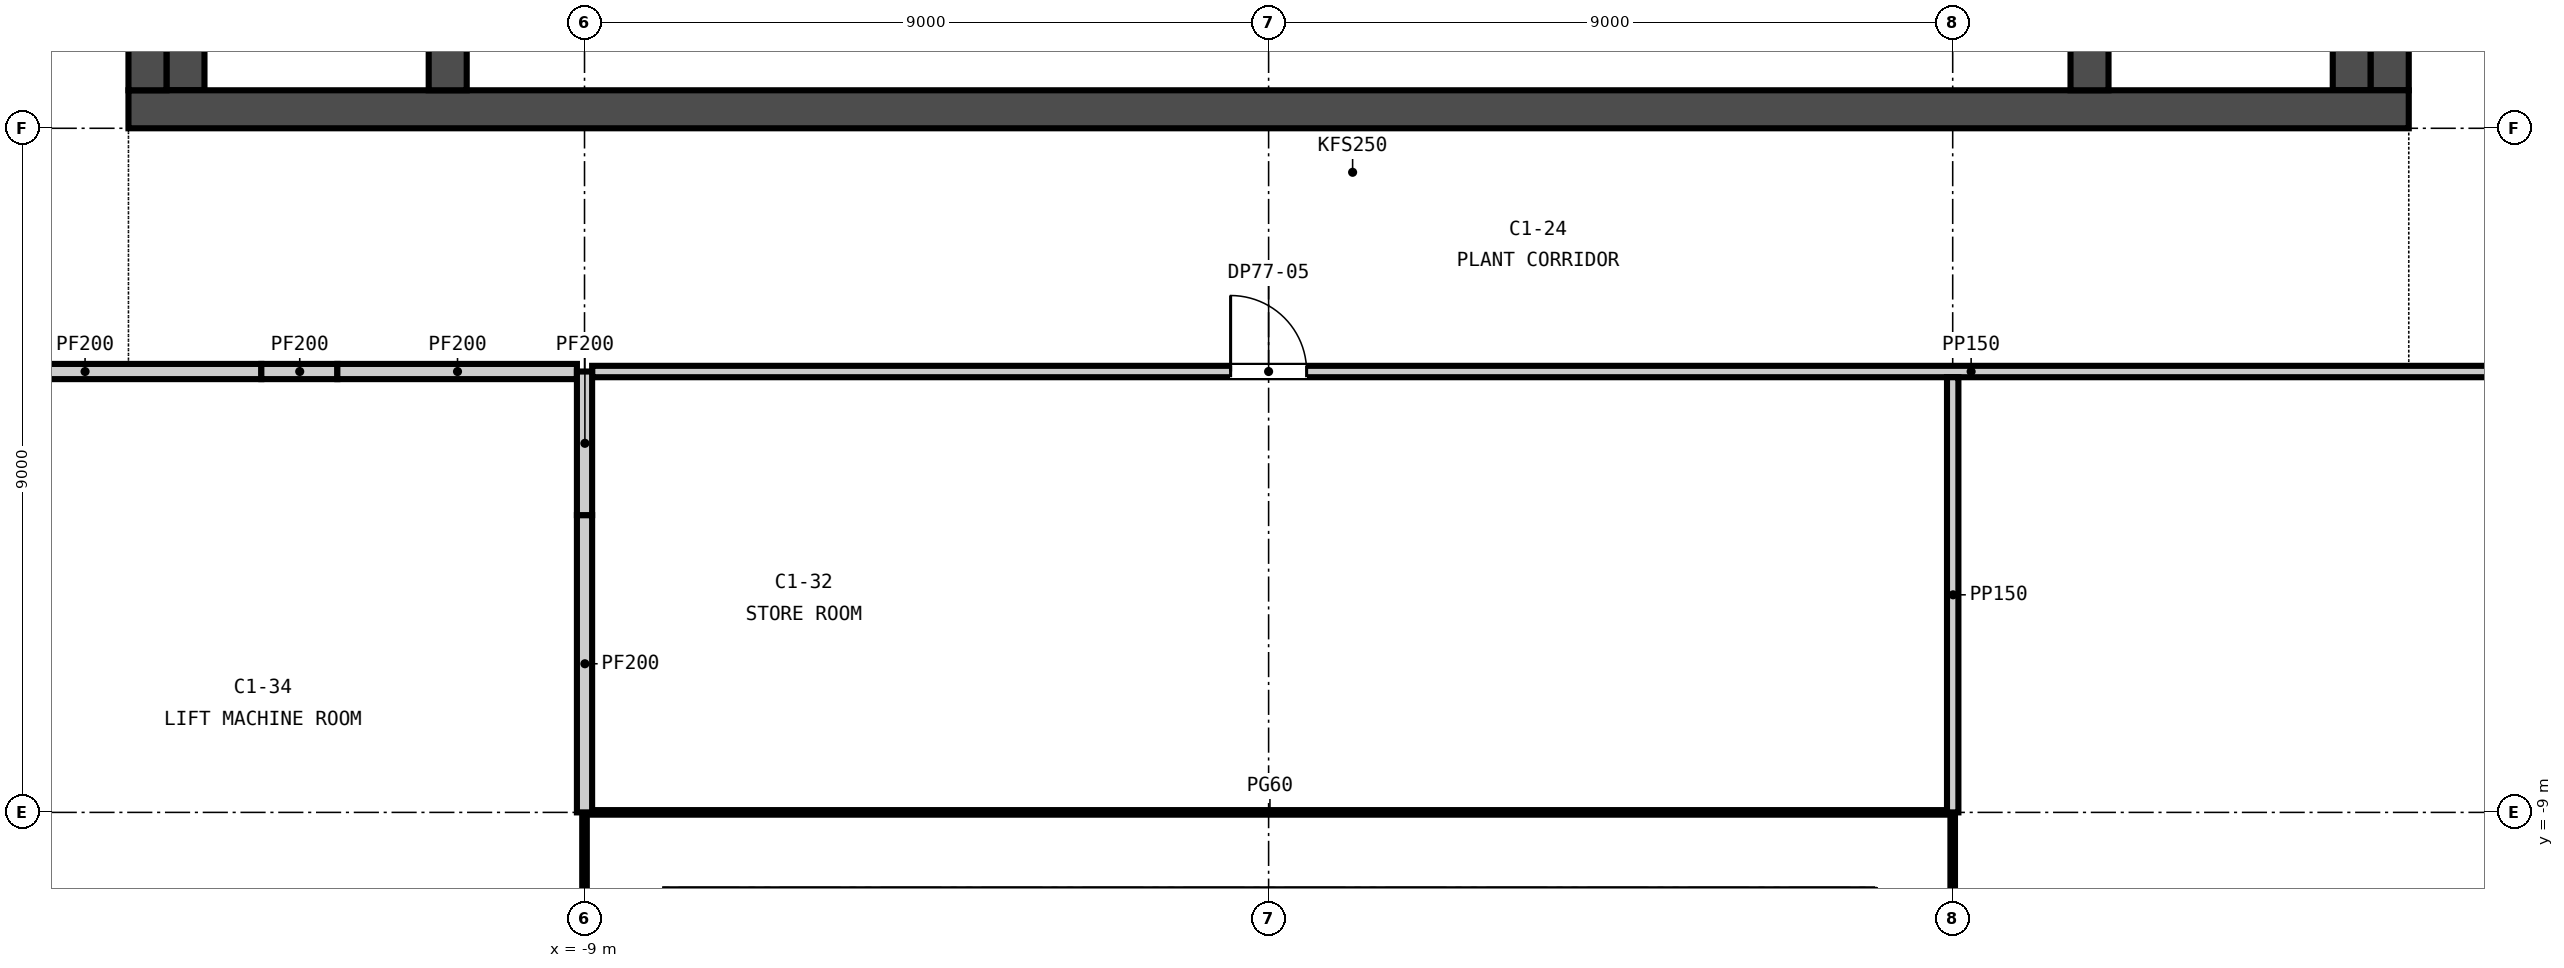
"""IFC4 building model, lengths in metres.
Left out: names, types, materials, properties, quantities, classifications, styles, units other than length and angle.
Written with IfcOpenShell. Run it as: python <this file> out.ifc"""

import sys

from ifc_helpers import new_model, si_unit, direction, frame, frame_2d, origin, place, context, subcontext, project, spatial, rectangle, extrude, element, fill, save


model = new_model("IFC4")
c1 = context("Model", 3, precision=1e-05, world=origin(), true_north=direction((0.0, 1.0)))
c2 = subcontext(c1, "Body", "Model", "MODEL_VIEW")
j1 = project(units=[si_unit("LENGTHUNIT", "METRE"), si_unit("PLANEANGLEUNIT", "RADIAN")], contexts=[c1])
p1 = place(None, origin())
s1 = spatial("IfcSite", under=j1, at=p1, CompositionType="ELEMENT")
p2 = place(p1, origin())
s2 = spatial("IfcBuilding", under=s1, at=p2, CompositionType="ELEMENT")
p3 = place(p2, frame((0.0, 0.0, 301.1)))
s3 = spatial("IfcBuildingStorey", under=s2, at=p3, CompositionType="ELEMENT", Elevation=301.1)
p4 = place(p3, frame((-15.0, 0.25, -0.25), z_axis=(0.0, 0.0, 1.0), x_axis=(1.0, 0.0, 0.0)))
e1 = element("IfcWall", 1, at=p4, inside=s3, PredefinedType="SOLIDWALL", context=c2, shape_type="SweptSolid", body=[
    extrude(rectangle(XDim=30.0, YDim=0.5, at=frame_2d((15.0, 0.0))), origin(), (0.0, 0.0, 1.0), 5.0),
])
for number, where, z_axis, x_axis in (
    (2, (-14.75, 0.5, -0.25), (0.0, 0.0, 1.0), (0.0, 1.0, 0.0)),
    (3, (14.75, 0.5, -0.25), (0.0, 0.0, 1.0), (0.0, 1.0, 0.0)),
    (4, (-10.8, 0.5, -0.25), (0.0, 0.0, 1.0), (0.0, 1.0, 0.0)),
    (5, (10.8, 0.5, -0.25), (0.0, 0.0, 1.0), (0.0, 1.0, 0.0)),
):
    element("IfcWall", number, at=place(p3, frame(where, z_axis=z_axis, x_axis=x_axis)), inside=s3, PredefinedType="SOLIDWALL", context=c2, shape_type="SweptSolid", body=[
        extrude(rectangle(XDim=14.0, YDim=0.5, at=frame_2d((7.0, 0.0))), origin(), (0.0, 0.0, 1.0), 5.0),
    ])
for number, where, z_axis, x_axis in (
    (6, (-14.25, 0.5, 0.0), (0.0, 0.0, 1.0), (0.0, 1.0, 0.0)),
    (7, (14.25, 0.5, 0.0), (0.0, 0.0, 1.0), (0.0, 1.0, 0.0)),
):
    element("IfcWall", number, at=place(p3, frame(where, z_axis=z_axis, x_axis=x_axis)), inside=s3, PredefinedType="SOLIDWALL", context=c2, shape_type="SweptSolid", body=[
        extrude(rectangle(XDim=14.0, YDim=0.5, at=frame_2d((7.0, 0.0))), origin(), (0.0, 0.0, 1.0), 4.75),
    ])
p5 = place(p3, frame((-8.9, -9.0, 0.0), z_axis=(0.0, 0.0, 1.0), x_axis=(1.0, 0.0, 0.0)))
e8 = element("IfcWall", 8, at=p5, inside=s3, PredefinedType="PARTITIONING", context=c2, shape_type="SweptSolid", body=[
    extrude(rectangle(XDim=17.825, YDim=0.06, at=frame_2d((8.913, 0.0))), origin(), (0.0, 0.0, 1.0), 4.75),
])
p6 = place(p3, frame((-17.9, -3.2, 0.0), z_axis=(0.0, 0.0, 1.0), x_axis=(1.0, 0.0, 0.0)))
e9 = element("IfcWall", 9, at=p6, inside=s3, PredefinedType="PARTITIONING", context=c2, shape_type="SweptSolid", body=[
    extrude(rectangle(XDim=4.648, YDim=0.2, at=frame_2d((2.324, 0.0))), origin(), (0.0, 0.0, 1.0), 4.75),
])
p7 = place(p3, frame((-13.252, -3.2, 0.0), z_axis=(0.0, 0.0, 1.0), x_axis=(1.0, 0.0, 0.0)))
e10 = element("IfcWall", 10, at=p7, inside=s3, PredefinedType="PARTITIONING", context=c2, shape_type="SweptSolid", body=[
    extrude(rectangle(XDim=1.0, YDim=0.2, at=frame_2d((0.5, 0.0))), origin(), (0.0, 0.0, 1.0), 4.0),
])
p8 = place(p3, frame((-12.252, -3.2, 0.0), z_axis=(0.0, 0.0, 1.0), x_axis=(1.0, 0.0, 0.0)))
e11 = element("IfcWall", 11, at=p8, inside=s3, PredefinedType="PARTITIONING", context=c2, shape_type="SweptSolid", body=[
    extrude(rectangle(XDim=3.152, YDim=0.2, at=frame_2d((1.576, 0.0))), origin(), (0.0, 0.0, 1.0), 4.75),
])
p9 = place(p3, frame((-8.9, -3.2, 0.0), z_axis=(0.0, 0.0, 1.0), x_axis=(1.0, 0.0, 0.0)))
e12 = element("IfcWall", 12, at=p9, inside=s3, PredefinedType="PARTITIONING", context=c2, shape_type="SweptSolid", body=[
    extrude(rectangle(XDim=26.825, YDim=0.15, at=frame_2d((13.413, 0.0))), origin(), (0.0, 0.0, 1.0), 4.75),
])
p10 = place(p9, frame((8.4, 0.0, 0.0)))
e13 = element("IfcOpeningElement", 13, at=p10, cuts=e12, PredefinedType="OPENING", context=c2, shape_type="SweptSolid", body=[
    extrude(rectangle(XDim=1.0, YDim=2.1, at=frame_2d((0.5, 1.05))), frame((0.0, 0.085, 0.0), z_axis=(0.0, -1.0, 0.0), x_axis=(1.0, 0.0, 0.0)), (0.0, 0.0, 1.0), 0.17),
])
p11 = place(p3, frame((-9.0, -12.864, 0.0), z_axis=(0.0, 0.0, 1.0), x_axis=(0.0, 1.0, 0.0)))
e14 = element("IfcWall", 14, at=p11, inside=s3, PredefinedType="PARTITIONING", context=c2, shape_type="SweptSolid", body=[
    extrude(rectangle(XDim=3.863, YDim=0.06, at=frame_2d((1.932, 0.0))), origin(), (0.0, 0.0, 1.0), 4.75),
])
p12 = place(p3, frame((-9.0, -9.0, 0.0), z_axis=(0.0, 0.0, 1.0), x_axis=(0.0, 1.0, 0.0)))
e15 = element("IfcWall", 15, at=p12, inside=s3, PredefinedType="PARTITIONING", context=c2, shape_type="SweptSolid", body=[
    extrude(rectangle(XDim=3.911, YDim=0.2, at=frame_2d((1.956, 0.0))), origin(), (0.0, 0.0, 1.0), 4.75),
])
p13 = place(p3, frame((-9.0, -5.089, 0.0), z_axis=(0.0, 0.0, 1.0), x_axis=(0.0, 1.0, 0.0)))
e16 = element("IfcWall", 16, at=p13, inside=s3, PredefinedType="PARTITIONING", context=c2, shape_type="SweptSolid", body=[
    extrude(rectangle(XDim=1.889, YDim=0.2, at=frame_2d((0.945, 0.0))), origin(), (0.0, 0.0, 1.0), 4.0),
])
p14 = place(p3, frame((9.0, -15.599, 0.0), z_axis=(0.0, 0.0, 1.0), x_axis=(0.0, 1.0, 0.0)))
e17 = element("IfcWall", 17, at=p14, inside=s3, PredefinedType="PARTITIONING", context=c2, shape_type="SweptSolid", body=[
    extrude(rectangle(XDim=6.598, YDim=0.06, at=frame_2d((3.299, 0.0))), origin(), (0.0, 0.0, 1.0), 4.75),
])
p15 = place(p3, frame((9.0, -9.0, 0.0), z_axis=(0.0, 0.0, 1.0), x_axis=(0.0, 1.0, 0.0)))
e18 = element("IfcWall", 18, at=p15, inside=s3, PredefinedType="PARTITIONING", context=c2, shape_type="SweptSolid", body=[
    extrude(rectangle(XDim=5.725, YDim=0.15, at=frame_2d((2.863, 0.0))), origin(), (0.0, 0.0, 1.0), 4.75),
])
p16 = place(p10, origin())
e19 = element("IfcDoor", 19, at=p16, inside=s3, OperationType="SINGLE_SWING_LEFT", PredefinedType="DOOR", context=c2, shape_type="SweptSolid", body=[
    extrude(rectangle(XDim=1.0, YDim=2.1, at=frame_2d((0.5, 1.05))), frame((0.0, 0.025, 0.0), z_axis=(0.0, -1.0, 0.0), x_axis=(1.0, 0.0, 0.0)), (0.0, 0.0, 1.0), 0.05),
])
fill(e13, e19)
save(model, sys.argv[1])
